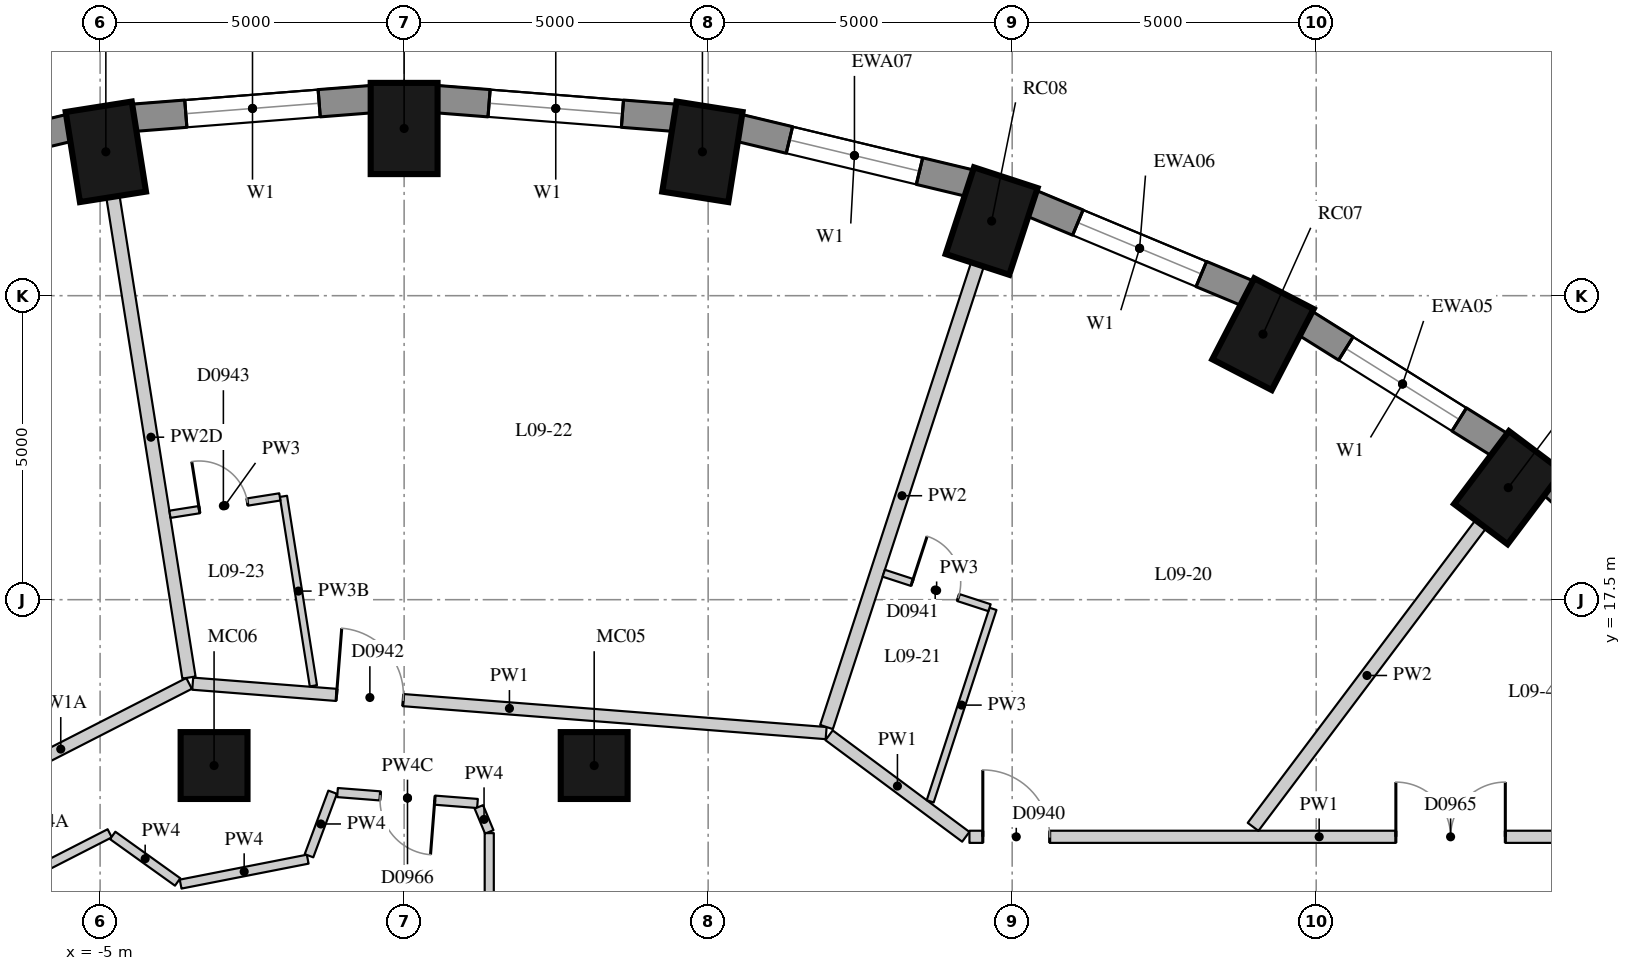
"""IFC4 building model, lengths in metres.
Left out: names, types, materials, properties, quantities, classifications, styles, units other than length and angle.
Written with IfcOpenShell. Run it as: python <this file> out.ifc"""

import sys

from ifc_helpers import new_model, si_unit, direction, frame, frame_2d, origin, origin_2d, place, context, subcontext, project, spatial, rectangle, extrude, element, fill, save


model = new_model("IFC4")
c1 = context("Model", 3, precision=1e-05, world=origin(), true_north=direction((0.0, 1.0)))
c2 = subcontext(c1, "Body", "Model", "MODEL_VIEW")
j1 = project(units=[si_unit("LENGTHUNIT", "METRE"), si_unit("PLANEANGLEUNIT", "RADIAN")], contexts=[c1])
p1 = place(None, origin())
s1 = spatial("IfcSite", under=j1, at=p1, CompositionType="ELEMENT")
p2 = place(p1, origin())
s2 = spatial("IfcBuilding", under=s1, at=p2, CompositionType="ELEMENT")
p3 = place(p2, frame((0.0, 0.0, 38.2)))
s3 = spatial("IfcBuildingStorey", under=s2, at=p3, CompositionType="ELEMENT", Elevation=38.2)
for number, where, z_axis, x_axis in (
    (1, (18.159, 19.343, 0.0), (0.0, 0.0, 1.0), (0.601, 0.799, 0.0)),
    (2, (14.125, 21.867, 0.0), (0.0, 0.0, 1.0), (0.46, 0.888, 0.0)),
    (3, (9.662, 23.727, 0.0), (0.0, 0.0, 1.0), (0.31, 0.951, 0.0)),
    (4, (4.906, 24.866, 0.0), (0.0, 0.0, 1.0), (0.156, 0.988, 0.0)),
    (5, (0.0, 25.25, 0.0), (0.0, 0.0, 1.0), (0.0, 1.0, 0.0)),
    (6, (-4.906, 24.866, 0.0), (0.0, 0.0, 1.0), (-0.156, 0.988, 0.0)),
):
    element("IfcColumn", number, at=place(p3, frame(where, z_axis=z_axis, x_axis=x_axis)), inside=s3, PredefinedType="COLUMN", context=c2, shape_type="SweptSolid", body=[
        extrude(rectangle(XDim=1.5, YDim=1.1, at=origin_2d()), origin(), (0.0, 0.0, 1.0), 3.3),
    ])
for number, where, z_axis, x_axis in (
    (7, (3.126, 14.772, 0.0), (0.0, 0.0, 1.0), (1.0, 0.0, 0.0)),
    (8, (-3.126, 14.772, 0.0), (0.0, 0.0, 1.0), (1.0, 0.0, 0.0)),
):
    element("IfcColumn", number, at=place(p3, frame(where, z_axis=z_axis, x_axis=x_axis)), inside=s3, PredefinedType="COLUMN", context=c2, shape_type="SweptSolid", body=[
        extrude(rectangle(XDim=1.1, YDim=1.1, at=origin_2d()), origin(), (0.0, 0.0, 1.0), 3.3),
    ])
p4 = place(p3, frame((21.627, 16.943, 0.0), z_axis=(0.0, 0.0, 1.0), x_axis=(-0.745526233716, 0.66647628228, 0.0)))
e9 = element("IfcWall", 9, at=p4, inside=s3, PredefinedType="SOLIDWALL", context=c2, shape_type="SweptSolid", body=[
    extrude(rectangle(XDim=3.697, YDim=0.45, at=frame_2d((1.848, 0.0))), origin(), (0.0, 0.0, 1.0), 3.02),
])
p5 = place(p3, frame((18.023, 20.044, 0.0), z_axis=(0.0, 0.0, 1.0), x_axis=(-0.847635480093, 0.530579016629, 0.0)))
e10 = element("IfcWall", 10, at=p5, inside=s3, PredefinedType="SOLIDWALL", context=c2, shape_type="SweptSolid", body=[
    extrude(rectangle(XDim=3.782, YDim=0.45, at=frame_2d((1.891, 0.0))), origin(), (0.0, 0.0, 1.0), 3.02),
])
p6 = place(p5, frame((0.791, 0.0, 0.4)))
e11 = element("IfcOpeningElement", 11, at=p6, cuts=e10, PredefinedType="OPENING", context=c2, shape_type="SweptSolid", body=[
    extrude(rectangle(XDim=2.2, YDim=1.75, at=frame_2d((1.1, 0.875))), frame((0.0, 0.235, 0.0), z_axis=(0.0, -1.0, 0.0), x_axis=(1.0, 0.0, 0.0)), (0.0, 0.0, 1.0), 0.47),
])
p7 = place(p3, frame((13.875, 22.537, 0.0), z_axis=(0.0, 0.0, 1.0), x_axis=(-0.923031964282, 0.384723267966, 0.0)))
e12 = element("IfcWall", 12, at=p7, inside=s3, PredefinedType="SOLIDWALL", context=c2, shape_type="SweptSolid", body=[
    extrude(rectangle(XDim=3.856, YDim=0.45, at=frame_2d((1.928, 0.0))), origin(), (0.0, 0.0, 1.0), 3.02),
])
p8 = place(p7, frame((0.828, 0.0, 0.4)))
e13 = element("IfcOpeningElement", 13, at=p8, cuts=e12, PredefinedType="OPENING", context=c2, shape_type="SweptSolid", body=[
    extrude(rectangle(XDim=2.2, YDim=1.75, at=frame_2d((1.1, 0.875))), frame((0.0, 0.235, 0.0), z_axis=(0.0, -1.0, 0.0), x_axis=(1.0, 0.0, 0.0)), (0.0, 0.0, 1.0), 0.47),
])
p9 = place(p3, frame((9.308, 24.35, 0.0), z_axis=(0.0, 0.0, 1.0), x_axis=(-0.972496561493, 0.232917233979, 0.0)))
e14 = element("IfcWall", 14, at=p9, inside=s3, PredefinedType="SOLIDWALL", context=c2, shape_type="SweptSolid", body=[
    extrude(rectangle(XDim=3.911, YDim=0.45, at=frame_2d((1.956, 0.0))), origin(), (0.0, 0.0, 1.0), 3.02),
])
p10 = place(p9, frame((0.855, 0.0, 0.4)))
e15 = element("IfcOpeningElement", 15, at=p10, cuts=e14, PredefinedType="OPENING", context=c2, shape_type="SweptSolid", body=[
    extrude(rectangle(XDim=2.2, YDim=1.75, at=frame_2d((1.1, 0.875))), frame((0.0, 0.235, 0.0), z_axis=(0.0, -1.0, 0.0), x_axis=(1.0, 0.0, 0.0)), (0.0, 0.0, 1.0), 0.47),
])
p11 = place(p3, frame((4.457, 25.426, 0.0), z_axis=(0.0, 0.0, 1.0), x_axis=(-0.996955972145, 0.077966592873, 0.0)))
e16 = element("IfcWall", 16, at=p11, inside=s3, PredefinedType="SOLIDWALL", context=c2, shape_type="SweptSolid", body=[
    extrude(rectangle(XDim=3.939, YDim=0.45, at=frame_2d((1.97, 0.0))), origin(), (0.0, 0.0, 1.0), 3.02),
])
p12 = place(p11, frame((0.87, 0.0, 0.4)))
e17 = element("IfcOpeningElement", 17, at=p12, cuts=e16, PredefinedType="OPENING", context=c2, shape_type="SweptSolid", body=[
    extrude(rectangle(XDim=2.2, YDim=1.75, at=frame_2d((1.1, 0.875))), frame((0.0, 0.235, 0.0), z_axis=(0.0, -1.0, 0.0), x_axis=(1.0, 0.0, 0.0)), (0.0, 0.0, 1.0), 0.47),
])
p13 = place(p3, frame((-0.53, 25.733, 0.0), z_axis=(0.0, 0.0, 1.0), x_axis=(-0.996955972145, -0.077966592873, 0.0)))
e18 = element("IfcWall", 18, at=p13, inside=s3, PredefinedType="SOLIDWALL", context=c2, shape_type="SweptSolid", body=[
    extrude(rectangle(XDim=3.939, YDim=0.45, at=frame_2d((1.97, 0.0))), origin(), (0.0, 0.0, 1.0), 3.02),
])
p14 = place(p13, frame((0.87, 0.0, 0.4)))
e19 = element("IfcOpeningElement", 19, at=p14, cuts=e18, PredefinedType="OPENING", context=c2, shape_type="SweptSolid", body=[
    extrude(rectangle(XDim=2.2, YDim=1.75, at=frame_2d((1.1, 0.875))), frame((0.0, 0.235, 0.0), z_axis=(0.0, -1.0, 0.0), x_axis=(1.0, 0.0, 0.0)), (0.0, 0.0, 1.0), 0.47),
])
p15 = place(p3, frame((-5.504, 25.26, 0.0), z_axis=(0.0, 0.0, 1.0), x_axis=(-0.972496561493, -0.232917233979, 0.0)))
e20 = element("IfcWall", 20, at=p15, inside=s3, PredefinedType="SOLIDWALL", context=c2, shape_type="SweptSolid", body=[
    extrude(rectangle(XDim=3.911, YDim=0.45, at=frame_2d((1.956, 0.0))), origin(), (0.0, 0.0, 1.0), 3.02),
])
p16 = place(p15, frame((0.855, 0.0, 0.4)))
e21 = element("IfcOpeningElement", 21, at=p16, cuts=e20, PredefinedType="OPENING", context=c2, shape_type="SweptSolid", body=[
    extrude(rectangle(XDim=2.2, YDim=1.75, at=frame_2d((1.1, 0.875))), frame((0.0, 0.235, 0.0), z_axis=(0.0, -1.0, 0.0), x_axis=(1.0, 0.0, 0.0)), (0.0, 0.0, 1.0), 0.47),
])
p17 = place(p3, frame((-7.757, 13.963, 0.0), z_axis=(0.0, 0.0, 1.0), x_axis=(0.89017531408, 0.455618162722, 0.0)))
e22 = element("IfcWall", 22, at=p17, inside=s3, PredefinedType="PARTITIONING", context=c2, shape_type="SweptSolid", body=[
    extrude(rectangle(XDim=4.741, YDim=0.2, at=frame_2d((2.371, 0.0))), origin(), (0.0, 0.0, 1.0), 2.57),
])
p18 = place(p17, frame((0.62, 0.0, 0.0)))
e23 = element("IfcOpeningElement", 23, at=p18, cuts=e22, PredefinedType="OPENING", context=c2, shape_type="SweptSolid", body=[
    extrude(rectangle(XDim=1.1, YDim=2.1, at=frame_2d((0.55, 1.05))), frame((0.0, 0.11, 0.0), z_axis=(0.0, -1.0, 0.0), x_axis=(1.0, 0.0, 0.0)), (0.0, 0.0, 1.0), 0.22),
])
p19 = place(p3, frame((-3.477, 16.118, 0.0), z_axis=(0.0, 0.0, 1.0), x_axis=(0.996970328684, -0.077782798383, 0.0)))
e24 = element("IfcWall", 24, at=p19, inside=s3, PredefinedType="PARTITIONING", context=c2, shape_type="SweptSolid", body=[
    extrude(rectangle(XDim=10.449, YDim=0.2, at=frame_2d((5.225, 0.0))), origin(), (0.0, 0.0, 1.0), 3.02),
])
p20 = place(p19, frame((2.372, 0.0, 0.0)))
e25 = element("IfcOpeningElement", 25, at=p20, cuts=e24, PredefinedType="OPENING", context=c2, shape_type="SweptSolid", body=[
    extrude(rectangle(XDim=1.1, YDim=2.1, at=frame_2d((0.55, 1.05))), frame((0.0, 0.11, 0.0), z_axis=(0.0, -1.0, 0.0), x_axis=(1.0, 0.0, 0.0)), (0.0, 0.0, 1.0), 0.22),
])
p21 = place(p3, frame((6.989, 15.27, 0.0), z_axis=(0.0, 0.0, 1.0), x_axis=(0.8028261118, -0.596213245586, 0.0)))
e26 = element("IfcWall", 26, at=p21, inside=s3, PredefinedType="PARTITIONING", context=c2, shape_type="SweptSolid", body=[
    extrude(rectangle(XDim=2.801, YDim=0.2, at=frame_2d((1.4, 0.0))), origin(), (0.0, 0.0, 1.0), 3.02),
])
p22 = place(p3, frame((9.297, 13.6, 0.0), z_axis=(0.0, 0.0, 1.0), x_axis=(1.0, 0.0, 0.0)))
e27 = element("IfcWall", 27, at=p22, inside=s3, PredefinedType="PARTITIONING", context=c2, shape_type="SweptSolid", body=[
    extrude(rectangle(XDim=11.503, YDim=0.2, at=frame_2d((5.751, 0.0))), origin(), (0.0, 0.0, 1.0), 3.02),
])
p23 = place(p22, frame((0.22, 0.0, 0.0)))
e28 = element("IfcOpeningElement", 28, at=p23, cuts=e27, PredefinedType="OPENING", context=c2, shape_type="SweptSolid", body=[
    extrude(rectangle(XDim=1.1, YDim=2.1, at=frame_2d((0.55, 1.05))), frame((0.0, 0.11, 0.0), z_axis=(0.0, -1.0, 0.0), x_axis=(1.0, 0.0, 0.0)), (0.0, 0.0, 1.0), 0.22),
])
p24 = place(p22, frame((7.013, 0.0, 0.0)))
e29 = element("IfcOpeningElement", 29, at=p24, cuts=e27, PredefinedType="OPENING", context=c2, shape_type="SweptSolid", body=[
    extrude(rectangle(XDim=1.8, YDim=2.1, at=frame_2d((0.9, 1.05))), frame((0.0, 0.11, 0.0), z_axis=(0.0, -1.0, 0.0), x_axis=(1.0, 0.0, 0.0)), (0.0, 0.0, 1.0), 0.22),
])
p25 = place(p3, frame((-3.676, 12.822, 0.0), z_axis=(0.0, 0.0, 1.0), x_axis=(0.981284032016, 0.192565958858, 0.0)))
e30 = element("IfcWall", 30, at=p25, inside=s3, PredefinedType="PARTITIONING", context=c2, shape_type="SweptSolid", body=[
    extrude(rectangle(XDim=2.13, YDim=0.15, at=frame_2d((1.065, 0.0))), origin(), (0.0, 0.0, 1.0), 3.02),
])
p26 = place(p3, frame((-1.564, 13.289, 0.0), z_axis=(0.0, 0.0, 1.0), x_axis=(0.348554808131, 0.937288400509, 0.0)))
e31 = element("IfcWall", 31, at=p26, inside=s3, PredefinedType="PARTITIONING", context=c2, shape_type="SweptSolid", body=[
    extrude(rectangle(XDim=1.115, YDim=0.15, at=frame_2d((0.558, 0.0))), origin(), (0.0, 0.0, 1.0), 3.02),
])
p27 = place(p3, frame((-1.096, 14.328, 0.0), z_axis=(0.0, 0.0, 1.0), x_axis=(0.996959190057, -0.077925434624, 0.0)))
e32 = element("IfcWall", 32, at=p27, inside=s3, PredefinedType="PARTITIONING", context=c2, shape_type="SweptSolid", body=[
    extrude(rectangle(XDim=2.309, YDim=0.15, at=frame_2d((1.155, 0.0))), origin(), (0.0, 0.0, 1.0), 2.42),
])
p28 = place(p27, frame((0.705, 0.0, 0.0)))
e33 = element("IfcOpeningElement", 33, at=p28, cuts=e32, PredefinedType="OPENING", context=c2, shape_type="SweptSolid", body=[
    extrude(rectangle(XDim=0.9, YDim=2.1, at=frame_2d((0.45, 1.05))), frame((0.0, 0.085, 0.0), z_axis=(0.0, -1.0, 0.0), x_axis=(1.0, 0.0, 0.0)), (0.0, 0.0, 1.0), 0.17),
])
p29 = place(p3, frame((1.229, 14.092, 0.0), z_axis=(0.0, 0.0, 1.0), x_axis=(0.38344820197, -0.923562383603, 0.0)))
e34 = element("IfcWall", 34, at=p29, inside=s3, PredefinedType="PARTITIONING", context=c2, shape_type="SweptSolid", body=[
    extrude(rectangle(XDim=0.446, YDim=0.15, at=frame_2d((0.223, 0.0))), origin(), (0.0, 0.0, 1.0), 3.02),
])
p30 = place(p3, frame((1.4, 13.661, 0.0), z_axis=(0.0, 0.0, 1.0), x_axis=(0.0, -1.0, 0.0)))
e35 = element("IfcWall", 35, at=p30, inside=s3, PredefinedType="PARTITIONING", context=c2, shape_type="SweptSolid", body=[
    extrude(rectangle(XDim=4.511, YDim=0.15, at=frame_2d((2.255, 0.0))), origin(), (0.0, 0.0, 1.0), 3.02),
])
p31 = place(p3, frame((-7.047, 12.53, 0.0), z_axis=(0.0, 0.0, 1.0), x_axis=(0.890208185307, 0.455553934032, 0.0)))
e36 = element("IfcWall", 36, at=p31, inside=s3, PredefinedType="PARTITIONING", context=c2, shape_type="SweptSolid", body=[
    extrude(rectangle(XDim=2.477, YDim=0.15, at=frame_2d((1.238, 0.0))), origin(), (0.0, 0.0, 1.0), 2.57),
])
p32 = place(p3, frame((-4.793, 13.623, 0.0), z_axis=(0.0, 0.0, 1.0), x_axis=(0.812853780358, -0.582467794611, 0.0)))
e37 = element("IfcWall", 37, at=p32, inside=s3, PredefinedType="PARTITIONING", context=c2, shape_type="SweptSolid", body=[
    extrude(rectangle(XDim=1.314, YDim=0.15, at=frame_2d((0.657, 0.0))), origin(), (0.0, 0.0, 1.0), 3.02),
])
p33 = place(p3, frame((17.708, 18.743, 0.0), z_axis=(0.0, 0.0, 1.0), x_axis=(-0.601177883261, -0.799115231164, 0.0)))
e38 = element("IfcWall", 38, at=p33, inside=s3, PredefinedType="PARTITIONING", context=c2, shape_type="SweptSolid", body=[
    extrude(rectangle(XDim=6.231, YDim=0.22, at=frame_2d((3.116, 0.0))), origin(), (0.0, 0.0, 1.0), 3.02),
])
p34 = place(p3, frame((9.429, 23.014, 0.0), z_axis=(0.0, 0.0, 1.0), x_axis=(-0.310227384954, -0.950662384669, 0.0)))
e39 = element("IfcWall", 39, at=p34, inside=s3, PredefinedType="PARTITIONING", context=c2, shape_type="SweptSolid", body=[
    extrude(rectangle(XDim=8.003, YDim=0.22, at=frame_2d((4.002, 0.0))), origin(), (0.0, 0.0, 1.0), 3.02),
])
p35 = place(p3, frame((-4.788, 24.125, 0.0), z_axis=(0.0, 0.0, 1.0), x_axis=(0.156108238506, -0.987739954578, 0.0)))
e40 = element("IfcWall", 40, at=p35, inside=s3, PredefinedType="PARTITIONING", context=c2, shape_type="SweptSolid", body=[
    extrude(rectangle(XDim=8.004, YDim=0.22, at=frame_2d((4.002, 0.0))), origin(), (0.0, 0.0, 1.0), 2.47),
])
p36 = place(p3, frame((8.651, 14.183, 0.0), z_axis=(0.0, 0.0, 1.0), x_axis=(0.310239544913, 0.950658416453, 0.0)))
e41 = element("IfcWall", 41, at=p36, inside=s3, PredefinedType="PARTITIONING", context=c2, shape_type="SweptSolid", body=[
    extrude(rectangle(XDim=3.33, YDim=0.12, at=frame_2d((1.665, 0.0))), origin(), (0.0, 0.0, 1.0), 3.02),
])
p37 = place(p3, frame((-1.492, 16.083, 0.0), z_axis=(0.0, 0.0, 1.0), x_axis=(-0.156073831214, 0.987745391895, 0.0)))
e42 = element("IfcWall", 42, at=p37, inside=s3, PredefinedType="PARTITIONING", context=c2, shape_type="SweptSolid", body=[
    extrude(rectangle(XDim=3.155, YDim=0.12, at=frame_2d((1.578, 0.0))), origin(), (0.0, 0.0, 1.0), 2.47),
])
p38 = place(p3, frame((9.627, 17.368, 0.0), z_axis=(0.0, 0.0, 1.0), x_axis=(-0.950678536911, 0.31017788357, 0.0)))
e43 = element("IfcWall", 43, at=p38, inside=s3, PredefinedType="PARTITIONING", context=c2, shape_type="SweptSolid", body=[
    extrude(rectangle(XDim=1.83, YDim=0.12, at=frame_2d((0.915, 0.0))), origin(), (0.0, 0.0, 1.0), 3.02),
])
p39 = place(p38, frame((0.54, 0.0, 0.0)))
e44 = element("IfcOpeningElement", 44, at=p39, cuts=e43, PredefinedType="OPENING", context=c2, shape_type="SweptSolid", body=[
    extrude(rectangle(XDim=0.8, YDim=2.1, at=frame_2d((0.4, 1.05))), frame((0.0, 0.07, 0.0), z_axis=(0.0, -1.0, 0.0), x_axis=(1.0, 0.0, 0.0)), (0.0, 0.0, 1.0), 0.14),
])
p40 = place(p3, frame((-2.044, 19.19, 0.0), z_axis=(0.0, 0.0, 1.0), x_axis=(-0.987722911621, -0.15621603586, 0.0)))
e45 = element("IfcWall", 45, at=p40, inside=s3, PredefinedType="PARTITIONING", context=c2, shape_type="SweptSolid", body=[
    extrude(rectangle(XDim=1.83, YDim=0.12, at=frame_2d((0.915, 0.0))), origin(), (0.0, 0.0, 1.0), 3.02),
])
p41 = place(p40, frame((0.54, 0.0, 0.0)))
e46 = element("IfcOpeningElement", 46, at=p41, cuts=e45, PredefinedType="OPENING", context=c2, shape_type="SweptSolid", body=[
    extrude(rectangle(XDim=0.8, YDim=2.1, at=frame_2d((0.4, 1.05))), frame((0.0, 0.07, 0.0), z_axis=(0.0, -1.0, 0.0), x_axis=(1.0, 0.0, 0.0)), (0.0, 0.0, 1.0), 0.14),
])
p42 = place(p6, origin())
e47 = element("IfcWindow", 47, at=p42, inside=s3, PartitioningType="SINGLE_PANEL", PredefinedType="WINDOW", context=c2, shape_type="SweptSolid", body=[
    extrude(rectangle(XDim=2.2, YDim=1.75, at=frame_2d((1.1, 0.875))), frame((0.0, 0.035, 0.0), z_axis=(0.0, -1.0, 0.0), x_axis=(1.0, 0.0, 0.0)), (0.0, 0.0, 1.0), 0.06),
])
fill(e11, e47)
p43 = place(p8, origin())
e48 = element("IfcWindow", 48, at=p43, inside=s3, PartitioningType="SINGLE_PANEL", PredefinedType="WINDOW", context=c2, shape_type="SweptSolid", body=[
    extrude(rectangle(XDim=2.2, YDim=1.75, at=frame_2d((1.1, 0.875))), frame((0.0, 0.035, 0.0), z_axis=(0.0, -1.0, 0.0), x_axis=(1.0, 0.0, 0.0)), (0.0, 0.0, 1.0), 0.06),
])
fill(e13, e48)
p44 = place(p10, origin())
e49 = element("IfcWindow", 49, at=p44, inside=s3, PartitioningType="SINGLE_PANEL", PredefinedType="WINDOW", context=c2, shape_type="SweptSolid", body=[
    extrude(rectangle(XDim=2.2, YDim=1.75, at=frame_2d((1.1, 0.875))), frame((0.0, 0.035, 0.0), z_axis=(0.0, -1.0, 0.0), x_axis=(1.0, 0.0, 0.0)), (0.0, 0.0, 1.0), 0.06),
])
fill(e15, e49)
p45 = place(p12, origin())
e50 = element("IfcWindow", 50, at=p45, inside=s3, PartitioningType="SINGLE_PANEL", PredefinedType="WINDOW", context=c2, shape_type="SweptSolid", body=[
    extrude(rectangle(XDim=2.2, YDim=1.75, at=frame_2d((1.1, 0.875))), frame((0.0, 0.035, 0.0), z_axis=(0.0, -1.0, 0.0), x_axis=(1.0, 0.0, 0.0)), (0.0, 0.0, 1.0), 0.06),
])
fill(e17, e50)
p46 = place(p14, origin())
e51 = element("IfcWindow", 51, at=p46, inside=s3, PartitioningType="SINGLE_PANEL", PredefinedType="WINDOW", context=c2, shape_type="SweptSolid", body=[
    extrude(rectangle(XDim=2.2, YDim=1.75, at=frame_2d((1.1, 0.875))), frame((0.0, 0.035, 0.0), z_axis=(0.0, -1.0, 0.0), x_axis=(1.0, 0.0, 0.0)), (0.0, 0.0, 1.0), 0.06),
])
fill(e19, e51)
p47 = place(p23, origin())
e52 = element("IfcDoor", 52, at=p47, inside=s3, OperationType="SINGLE_SWING_LEFT", PredefinedType="DOOR", context=c2, shape_type="SweptSolid", body=[
    extrude(rectangle(XDim=1.1, YDim=2.1, at=frame_2d((0.55, 1.05))), frame((0.0, 0.025, 0.0), z_axis=(0.0, -1.0, 0.0), x_axis=(1.0, 0.0, 0.0)), (0.0, 0.0, 1.0), 0.05),
])
fill(e28, e52)
p48 = place(p39, origin())
e53 = element("IfcDoor", 53, at=p48, inside=s3, OperationType="SINGLE_SWING_LEFT", PredefinedType="DOOR", context=c2, shape_type="SweptSolid", body=[
    extrude(rectangle(XDim=0.8, YDim=2.1, at=frame_2d((0.4, 1.05))), frame((0.0, 0.025, 0.0), z_axis=(0.0, -1.0, 0.0), x_axis=(1.0, 0.0, 0.0)), (0.0, 0.0, 1.0), 0.05),
])
fill(e44, e53)
p49 = place(p20, origin())
e54 = element("IfcDoor", 54, at=p49, inside=s3, OperationType="SINGLE_SWING_LEFT", PredefinedType="DOOR", context=c2, shape_type="SweptSolid", body=[
    extrude(rectangle(XDim=1.1, YDim=2.1, at=frame_2d((0.55, 1.05))), frame((0.0, 0.025, 0.0), z_axis=(0.0, -1.0, 0.0), x_axis=(1.0, 0.0, 0.0)), (0.0, 0.0, 1.0), 0.05),
])
fill(e25, e54)
p50 = place(p41, origin())
e55 = element("IfcDoor", 55, at=p50, inside=s3, OperationType="SINGLE_SWING_LEFT", PredefinedType="DOOR", context=c2, shape_type="SweptSolid", body=[
    extrude(rectangle(XDim=0.8, YDim=2.1, at=frame_2d((0.4, 1.05))), frame((0.0, 0.025, 0.0), z_axis=(0.0, -1.0, 0.0), x_axis=(1.0, 0.0, 0.0)), (0.0, 0.0, 1.0), 0.05),
])
fill(e46, e55)
p51 = place(p24, origin())
e56 = element("IfcDoor", 56, at=p51, inside=s3, OperationType="DOUBLE_DOOR_SINGLE_SWING", PredefinedType="DOOR", context=c2, shape_type="SweptSolid", body=[
    extrude(rectangle(XDim=1.8, YDim=2.1, at=frame_2d((0.9, 1.05))), frame((0.0, 0.025, 0.0), z_axis=(0.0, -1.0, 0.0), x_axis=(1.0, 0.0, 0.0)), (0.0, 0.0, 1.0), 0.05),
])
fill(e29, e56)
p52 = place(p28, origin())
e57 = element("IfcDoor", 57, at=p52, inside=s3, OperationType="SINGLE_SWING_LEFT", PredefinedType="DOOR", context=c2, shape_type="SweptSolid", body=[
    extrude(rectangle(XDim=0.9, YDim=2.1, at=frame_2d((0.45, 1.05))), frame((0.0, 0.025, 0.0), z_axis=(0.0, -1.0, 0.0), x_axis=(1.0, 0.0, 0.0)), (0.0, 0.0, 1.0), 0.05),
])
fill(e33, e57)
save(model, sys.argv[1])
